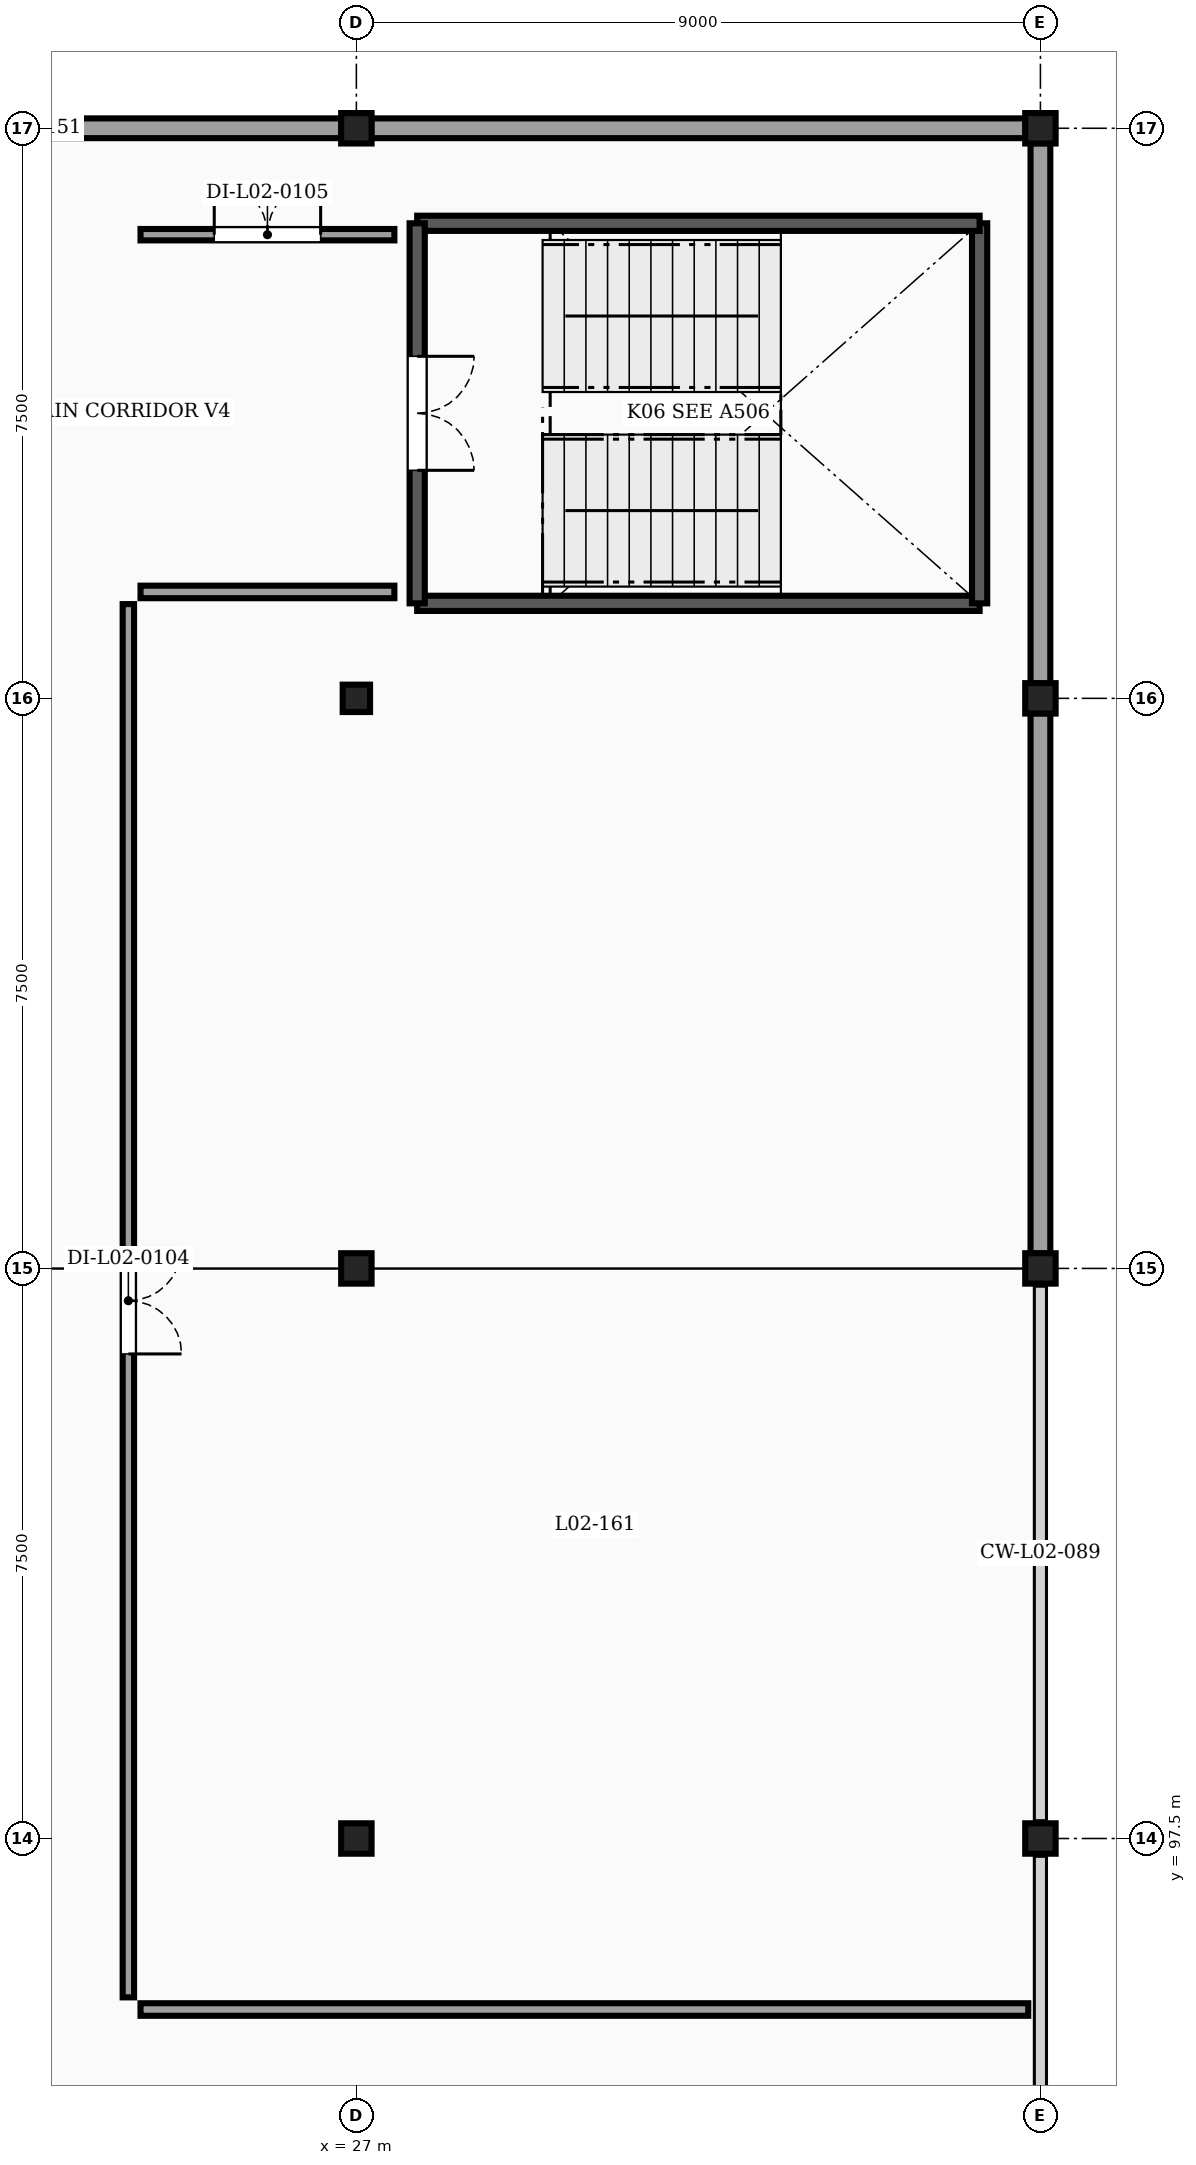
"""IFC4 building model, lengths in metres.
Left out: names, types, materials, properties, quantities, classifications, styles, units other than length and angle.
Written with IfcOpenShell. Run it as: python <this file> out.ifc"""

import sys

from ifc_helpers import new_model, si_unit, direction, frame, frame_2d, origin, origin_2d, place, context, subcontext, project, spatial, rectangle, extrude, element, fill, save


model = new_model("IFC4")
c1 = context("Model", 3, precision=1e-05, world=origin(), true_north=direction((0.0, 1.0)))
c2 = subcontext(c1, "Body", "Model", "MODEL_VIEW")
j1 = project(units=[si_unit("LENGTHUNIT", "METRE"), si_unit("PLANEANGLEUNIT", "RADIAN")], contexts=[c1])
p1 = place(None, origin())
s1 = spatial("IfcSite", under=j1, at=p1, CompositionType="ELEMENT")
p2 = place(p1, origin())
s2 = spatial("IfcBuilding", under=s1, at=p2, CompositionType="ELEMENT")
p3 = place(p2, frame((0.0, 0.0, 8.5)))
s3 = spatial("IfcBuildingStorey", under=s2, at=p3, CompositionType="ELEMENT", Elevation=8.5)
for number, where, z_axis, x_axis in (
    (1, (27.0, 97.5, 0.0), (0.0, 0.0, 1.0), (1.0, 0.0, 0.0)),
    (2, (36.0, 97.5, 0.0), (0.0, 0.0, 1.0), (1.0, 0.0, 0.0)),
    (3, (27.0, 105.0, 0.0), (0.0, 0.0, 1.0), (1.0, 0.0, 0.0)),
    (4, (36.0, 105.0, 0.0), (0.0, 0.0, 1.0), (1.0, 0.0, 0.0)),
):
    element("IfcColumn", number, at=place(p3, frame(where, z_axis=z_axis, x_axis=x_axis)), inside=s3, PredefinedType="COLUMN", context=c2, shape_type="SweptSolid", body=[
        extrude(rectangle(XDim=0.4, YDim=0.4, at=origin_2d()), origin(), (0.0, 0.0, 1.0), 3.8),
    ])
p4 = place(p3, frame((27.0, 112.5, 0.0), z_axis=(0.0, 0.0, 1.0), x_axis=(1.0, 0.0, 0.0)))
e5 = element("IfcColumn", 5, at=p4, inside=s3, PredefinedType="COLUMN", context=c2, shape_type="SweptSolid", body=[
    extrude(rectangle(XDim=0.36, YDim=0.36, at=origin_2d()), origin(), (0.0, 0.0, 1.0), 3.8),
])
for number, where, z_axis, x_axis in (
    (6, (36.0, 112.5, 0.0), (0.0, 0.0, 1.0), (1.0, 0.0, 0.0)),
    (7, (27.0, 120.0, 0.0), (0.0, 0.0, 1.0), (1.0, 0.0, 0.0)),
    (8, (36.0, 120.0, 0.0), (0.0, 0.0, 1.0), (1.0, 0.0, 0.0)),
):
    element("IfcColumn", number, at=place(p3, frame(where, z_axis=z_axis, x_axis=x_axis)), inside=s3, PredefinedType="COLUMN", context=c2, shape_type="SweptSolid", body=[
        extrude(rectangle(XDim=0.4, YDim=0.4, at=origin_2d()), origin(), (0.0, 0.0, 1.0), 3.8),
    ])
for number, where, z_axis, x_axis in (
    (9, (18.196, 120.0, 0.0), (0.0, 0.0, 1.0), (1.0, 0.0, 0.0)),
    (10, (27.196, 120.0, 0.0), (0.0, 0.0, 1.0), (1.0, 0.0, 0.0)),
):
    element("IfcWall", number, at=place(p3, frame(where, z_axis=z_axis, x_axis=x_axis)), inside=s3, PredefinedType="SOLIDWALL", context=c2, shape_type="SweptSolid", body=[
        extrude(rectangle(XDim=8.608, YDim=0.26, at=frame_2d((4.304, 0.0))), origin(), (0.0, 0.0, 1.0), 2.987),
    ])
for number, where, z_axis, x_axis in (
    (11, (36.0, 119.804, 0.0), (0.0, 0.0, 1.0), (0.0, -1.0, 0.0)),
    (12, (36.0, 112.304, 0.0), (0.0, 0.0, 1.0), (0.0, -1.0, 0.0)),
):
    element("IfcWall", number, at=place(p3, frame(where, z_axis=z_axis, x_axis=x_axis)), inside=s3, PredefinedType="SOLIDWALL", context=c2, shape_type="SweptSolid", body=[
        extrude(rectangle(XDim=7.108, YDim=0.26, at=frame_2d((3.554, 0.0))), origin(), (0.0, 0.0, 1.0), 2.987),
    ])
p5 = place(p3, frame((27.8, 113.75, 0.0), z_axis=(0.0, 0.0, 1.0), x_axis=(1.0, 0.0, 0.0)))
e13 = element("IfcWall", 13, at=p5, inside=s3, PredefinedType="SHEAR", context=c2, shape_type="SweptSolid", body=[
    extrude(rectangle(XDim=7.4, YDim=0.2, at=frame_2d((3.7, 0.0))), origin(), (0.0, 0.0, 1.0), 3.58),
])
p6 = place(p3, frame((35.2, 113.75, 0.0), z_axis=(0.0, 0.0, 1.0), x_axis=(0.0, 1.0, 0.0)))
e14 = element("IfcWall", 14, at=p6, inside=s3, PredefinedType="SHEAR", context=c2, shape_type="SweptSolid", body=[
    extrude(rectangle(XDim=5.0, YDim=0.2, at=frame_2d((2.5, 0.0))), origin(), (0.0, 0.0, 1.0), 3.58),
])
p7 = place(p3, frame((35.2, 118.75, 0.0), z_axis=(0.0, 0.0, 1.0), x_axis=(-1.0, 0.0, 0.0)))
e15 = element("IfcWall", 15, at=p7, inside=s3, PredefinedType="SHEAR", context=c2, shape_type="SweptSolid", body=[
    extrude(rectangle(XDim=7.4, YDim=0.2, at=frame_2d((3.7, 0.0))), origin(), (0.0, 0.0, 1.0), 3.58),
])
p8 = place(p3, frame((27.8, 118.75, 0.0), z_axis=(0.0, 0.0, 1.0), x_axis=(0.0, -1.0, 0.0)))
e16 = element("IfcWall", 16, at=p8, inside=s3, PredefinedType="SHEAR", context=c2, shape_type="SweptSolid", body=[
    extrude(rectangle(XDim=5.0, YDim=0.2, at=frame_2d((2.5, 0.0))), origin(), (0.0, 0.0, 1.0), 3.58),
])
p9 = place(p8, frame((1.75, 0.0, 0.0)))
e17 = element("IfcOpeningElement", 17, at=p9, cuts=e16, PredefinedType="OPENING", context=c2, shape_type="SweptSolid", body=[
    extrude(rectangle(XDim=1.5, YDim=2.15, at=frame_2d((0.75, 1.075))), frame((0.0, 0.11, 0.0), z_axis=(0.0, -1.0, 0.0), x_axis=(1.0, 0.0, 0.0)), (0.0, 0.0, 1.0), 0.22),
])
p10 = place(p3, frame((27.5, 113.9, 0.0), z_axis=(0.0, 0.0, 1.0), x_axis=(-1.0, 0.0, 0.0)))
e18 = element("IfcWall", 18, at=p10, inside=s3, PredefinedType="PARTITIONING", context=c2, shape_type="SweptSolid", body=[
    extrude(rectangle(XDim=3.34, YDim=0.165, at=frame_2d((1.67, 0.0))), origin(), (0.0, 0.0, 1.0), 3.58),
])
p11 = place(p3, frame((24.0, 113.74, 0.0), z_axis=(0.0, 0.0, 1.0), x_axis=(0.0, -1.0, 0.0)))
e19 = element("IfcWall", 19, at=p11, inside=s3, PredefinedType="PARTITIONING", context=c2, shape_type="SweptSolid", body=[
    extrude(rectangle(XDim=18.33, YDim=0.15, at=frame_2d((9.165, 0.0))), origin(), (0.0, 0.0, 1.0), 3.172),
])
p12 = place(p11, frame((8.465, 0.0, 0.0)))
e20 = element("IfcOpeningElement", 20, at=p12, cuts=e19, PredefinedType="OPENING", context=c2, shape_type="SweptSolid", body=[
    extrude(rectangle(XDim=1.4, YDim=2.15, at=frame_2d((0.7, 1.075))), frame((0.0, 0.085, 0.0), z_axis=(0.0, -1.0, 0.0), x_axis=(1.0, 0.0, 0.0)), (0.0, 0.0, 1.0), 0.17),
])
p13 = place(p3, frame((24.16, 95.25, 0.0), z_axis=(0.0, 0.0, 1.0), x_axis=(1.0, 0.0, 0.0)))
e21 = element("IfcWall", 21, at=p13, inside=s3, PredefinedType="PARTITIONING", context=c2, shape_type="SweptSolid", body=[
    extrude(rectangle(XDim=11.68, YDim=0.165, at=frame_2d((5.84, 0.0))), origin(), (0.0, 0.0, 1.0), 3.58),
])
p14 = place(p3, frame((24.16, 118.6, 0.0), z_axis=(0.0, 0.0, 1.0), x_axis=(1.0, 0.0, 0.0)))
e22 = element("IfcWall", 22, at=p14, inside=s3, PredefinedType="PARTITIONING", context=c2, shape_type="SweptSolid", body=[
    extrude(rectangle(XDim=3.34, YDim=0.15, at=frame_2d((1.67, 0.0))), origin(), (0.0, 0.0, 1.0), 3.58),
])
p15 = place(p14, frame((0.97, 0.0, 0.0)))
e23 = element("IfcOpeningElement", 23, at=p15, cuts=e22, PredefinedType="OPENING", context=c2, shape_type="SweptSolid", body=[
    extrude(rectangle(XDim=1.4, YDim=2.15, at=frame_2d((0.7, 1.075))), frame((0.0, 0.085, 0.0), z_axis=(0.0, -1.0, 0.0), x_axis=(1.0, 0.0, 0.0)), (0.0, 0.0, 1.0), 0.17),
])
p16 = place(p9, origin())
e24 = element("IfcDoor", 24, at=p16, inside=s3, OperationType="DOUBLE_DOOR_SINGLE_SWING", PredefinedType="DOOR", context=c2, shape_type="SweptSolid", body=[
    extrude(rectangle(XDim=1.5, YDim=2.15, at=frame_2d((0.75, 1.075))), frame((0.0, 0.025, 0.0), z_axis=(0.0, -1.0, 0.0), x_axis=(1.0, 0.0, 0.0)), (0.0, 0.0, 1.0), 0.05),
])
fill(e17, e24)
p17 = place(p12, origin())
e25 = element("IfcDoor", 25, at=p17, inside=s3, OperationType="DOUBLE_DOOR_SINGLE_SWING", PredefinedType="DOOR", context=c2, shape_type="SweptSolid", body=[
    extrude(rectangle(XDim=1.4, YDim=2.15, at=frame_2d((0.7, 1.075))), frame((0.0, 0.025, 0.0), z_axis=(0.0, -1.0, 0.0), x_axis=(1.0, 0.0, 0.0)), (0.0, 0.0, 1.0), 0.05),
])
fill(e20, e25)
p18 = place(p15, origin())
e26 = element("IfcDoor", 26, at=p18, inside=s3, OperationType="DOUBLE_DOOR_SINGLE_SWING", PredefinedType="DOOR", context=c2, shape_type="SweptSolid", body=[
    extrude(rectangle(XDim=1.4, YDim=2.15, at=frame_2d((0.7, 1.075))), frame((0.0, 0.025, 0.0), z_axis=(0.0, -1.0, 0.0), x_axis=(1.0, 0.0, 0.0)), (0.0, 0.0, 1.0), 0.05),
])
fill(e23, e26)
save(model, sys.argv[1])
